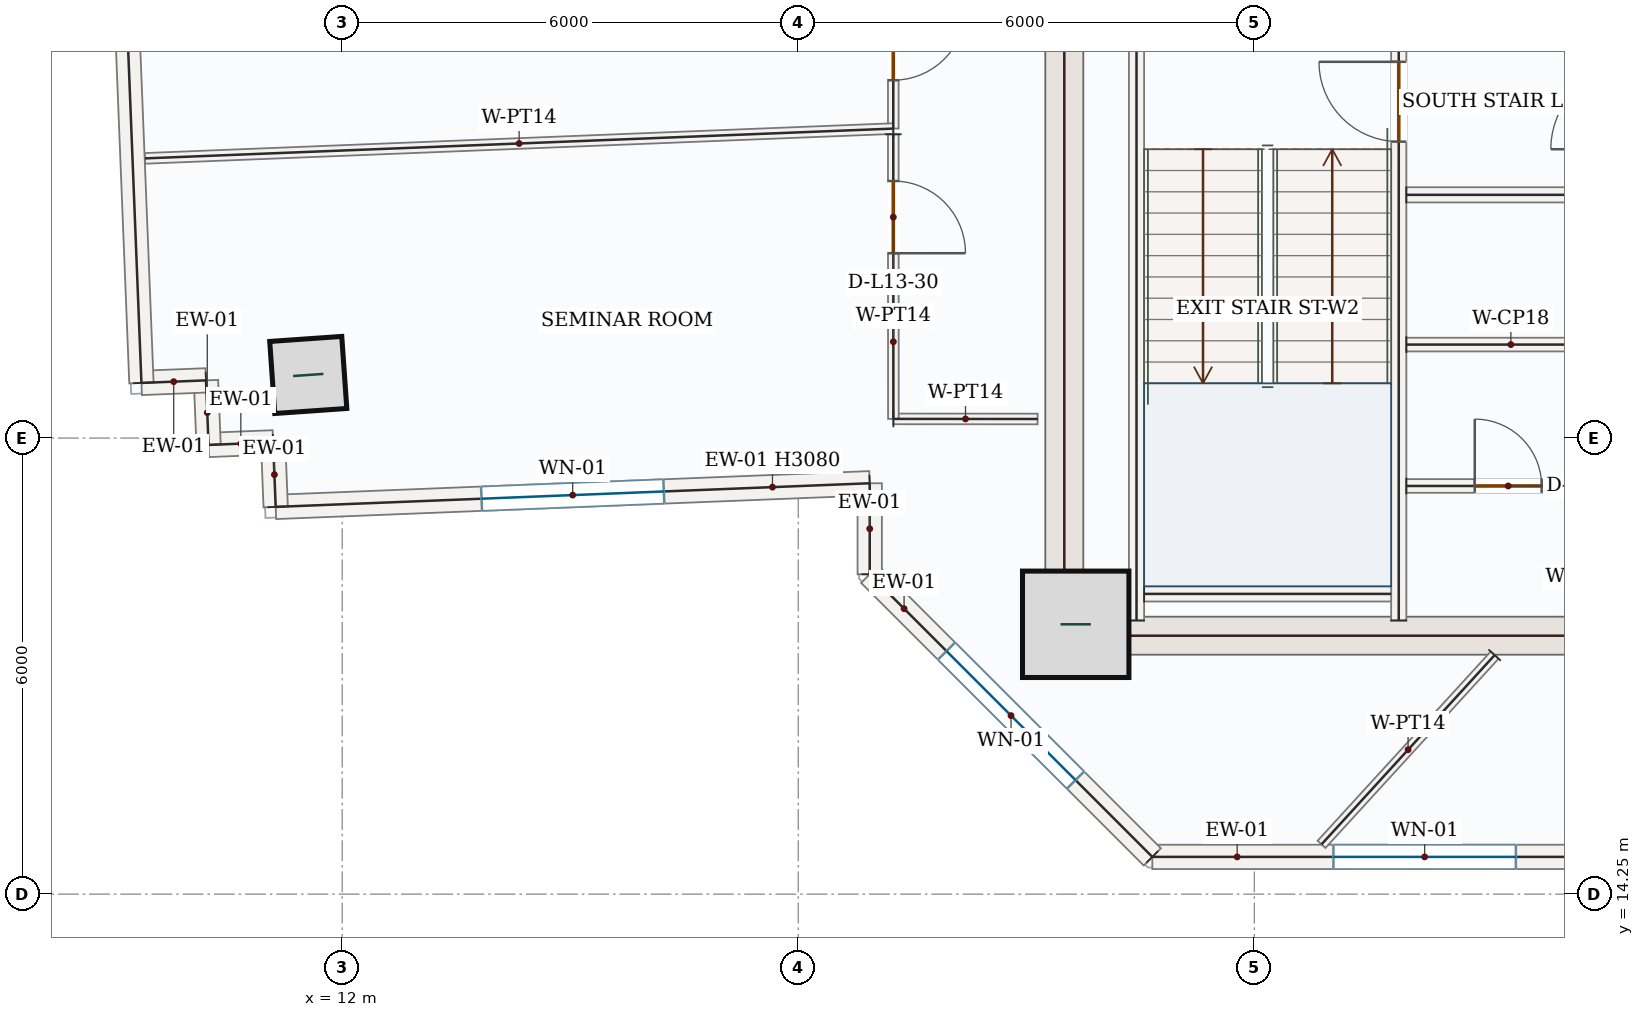
"""IFC4 building model, lengths in metres.
Left out: names, types, materials, properties, quantities, classifications, styles, units other than length and angle.
Written with IfcOpenShell. Run it as: python <this file> out.ifc"""

import sys

from ifc_helpers import new_model, si_unit, direction, frame, frame_2d, origin, origin_2d, place, context, subcontext, project, spatial, rectangle, hollow_rectangle, extrude, source, transform, mapped, element, fill, save


model = new_model("IFC4")
c1 = context("Model", 3, precision=1e-05, world=origin(), true_north=direction((0.0, 1.0)))
c2 = subcontext(c1, "Body", "Model", "MODEL_VIEW")
j1 = project(units=[si_unit("LENGTHUNIT", "METRE"), si_unit("PLANEANGLEUNIT", "RADIAN")], contexts=[c1])
p1 = place(None, origin())
s1 = spatial("IfcSite", under=j1, at=p1, CompositionType="ELEMENT")
p2 = place(p1, origin())
s2 = spatial("IfcBuilding", under=s1, at=p2, CompositionType="ELEMENT")
p3 = place(p2, frame((0.0, 0.0, 62.7)))
s3 = spatial("IfcBuildingStorey", under=s2, at=p3, CompositionType="ELEMENT", Elevation=62.7)
m1 = source(origin(), c2, "Body", "SweptSolid", [
    extrude(rectangle(XDim=8.55, YDim=0.5, at=frame_2d((4.275, 0.0))), origin(), (0.0, 0.0, 1.0), 3.95),
])
p4 = place(p3, frame((21.5, 17.4, 0.0), z_axis=(0.0, 0.0, 1.0), x_axis=(0.0, 1.0, 0.0)))
e1 = element("IfcWall", 1, at=p4, inside=s3, PredefinedType="SHEAR", context=c2, shape_type="MappedRepresentation", body=[
    mapped(m1, transform((0.0, 0.0, 0.0), x_axis=(1.0, 0.0, 0.0), y_axis=(0.0, 1.0, 0.0), z_axis=(0.0, 0.0, 1.0), scale=1.0)),
])
m2 = source(origin(), c2, "Body", "SweptSolid", [
    extrude(rectangle(XDim=7.0, YDim=0.5, at=frame_2d((3.5, 0.0))), origin(), (0.0, 0.0, 1.0), 3.95),
])
p5 = place(p3, frame((21.75, 17.65, 0.0), z_axis=(0.0, 0.0, 1.0), x_axis=(1.0, 0.0, 0.0)))
e2 = element("IfcWall", 2, at=p5, inside=s3, PredefinedType="SHEAR", context=c2, shape_type="MappedRepresentation", body=[
    mapped(m2, transform((0.0, 0.0, 0.0), x_axis=(1.0, 0.0, 0.0), y_axis=(0.0, 1.0, 0.0), z_axis=(0.0, 0.0, 1.0), scale=1.0)),
])
m3 = source(origin(), c2, "Body", "SweptSolid", [
    extrude(rectangle(XDim=1.4, YDim=1.4, at=origin_2d()), origin(), (0.0, 0.0, 1.0), 4.2),
])
p6 = place(p3, frame((21.65, 17.8, 0.0), z_axis=(0.0, 0.0, 1.0), x_axis=(1.0, 0.0, 0.0)))
e3 = element("IfcColumn", 3, at=p6, inside=s3, PredefinedType="COLUMN", context=c2, shape_type="MappedRepresentation", body=[
    mapped(m3, transform((0.0, 0.0, 0.0), x_axis=(1.0, 0.0, 0.0), y_axis=(0.0, 1.0, 0.0), z_axis=(0.0, 0.0, 1.0), scale=1.0)),
])
m4 = source(origin(), c2, "Body", "SweptSolid", [
    extrude(hollow_rectangle(XDim=0.95, YDim=0.95, WallThickness=0.05, at=origin_2d()), origin(), (0.0, 0.0, 1.0), 4.2),
])
p7 = place(p3, frame((11.553, 21.08, 0.0), z_axis=(0.0, 0.0, 1.0), x_axis=(0.99756405026, 0.069756473744, 0.0)))
e4 = element("IfcColumn", 4, at=p7, inside=s3, PredefinedType="COLUMN", context=c2, shape_type="MappedRepresentation", body=[
    mapped(m4, transform((0.0, 0.0, 0.0), x_axis=(1.0, 0.0, 0.0), y_axis=(0.0, 1.0, 0.0), z_axis=(0.0, 0.0, 1.0), scale=1.0)),
])
p8 = place(p3, frame((29.823, 14.74, 0.0), z_axis=(0.0, 0.0, 1.0), x_axis=(-1.0, 0.0, 0.0)))
e5 = element("IfcWall", 5, at=p8, inside=s3, PredefinedType="SOLIDWALL", context=c2, shape_type="SweptSolid", body=[
    extrude(rectangle(XDim=7.165, YDim=0.32, at=frame_2d((3.583, 0.0))), origin(), (0.0, 0.0, 1.0), 3.95),
])
p9 = place(p8, frame((2.382, 0.0, 0.85)))
e6 = element("IfcOpeningElement", 6, at=p9, cuts=e5, PredefinedType="OPENING", context=c2, shape_type="SweptSolid", body=[
    extrude(rectangle(XDim=2.4, YDim=1.8, at=frame_2d((1.2, 0.9))), frame((0.0, 0.17, 0.0), z_axis=(0.0, -1.0, 0.0), x_axis=(1.0, 0.0, 0.0)), (0.0, 0.0, 1.0), 0.34),
])
p10 = place(p3, frame((22.658, 14.74, 0.0), z_axis=(0.0, 0.0, 1.0), x_axis=(-0.707106781187, 0.707106781187, 0.0)))
e7 = element("IfcWall", 7, at=p10, inside=s3, PredefinedType="SOLIDWALL", context=c2, shape_type="SweptSolid", body=[
    extrude(rectangle(XDim=5.258, YDim=0.32, at=frame_2d((2.629, 0.0))), origin(), (0.0, 0.0, 1.0), 3.95),
])
p11 = place(p10, frame((1.429, 0.0, 0.85)))
e8 = element("IfcOpeningElement", 8, at=p11, cuts=e7, PredefinedType="OPENING", context=c2, shape_type="SweptSolid", body=[
    extrude(rectangle(XDim=2.4, YDim=1.8, at=frame_2d((1.2, 0.9))), frame((0.0, 0.17, 0.0), z_axis=(0.0, -1.0, 0.0), x_axis=(1.0, 0.0, 0.0)), (0.0, 0.0, 1.0), 0.34),
])
m5 = source(origin(), c2, "Body", "SweptSolid", [
    extrude(rectangle(XDim=1.198, YDim=0.32, at=frame_2d((0.599, 0.0))), origin(), (0.0, 0.0, 1.0), 3.95),
])
p12 = place(p3, frame((18.94, 18.458, 0.0), z_axis=(0.0, 0.0, 1.0), x_axis=(0.0, 1.0, 0.0)))
e9 = element("IfcWall", 9, at=p12, inside=s3, PredefinedType="SOLIDWALL", context=c2, shape_type="MappedRepresentation", body=[
    mapped(m5, transform((0.0, 0.0, 0.0), x_axis=(1.0, 0.0, 0.0), y_axis=(0.0, 1.0, 0.0), z_axis=(0.0, 0.0, 1.0), scale=1.0)),
])
p13 = place(p3, frame((18.94, 19.656, 0.0), z_axis=(0.0, 0.0, 1.0), x_axis=(-0.999208917222, -0.039768577336, 0.0)))
e10 = element("IfcWall", 10, at=p13, inside=s3, PredefinedType="SOLIDWALL", context=c2, shape_type="SweptSolid", body=[
    extrude(rectangle(XDim=7.821, YDim=0.32, at=frame_2d((3.911, 0.0))), origin(), (0.0, 0.0, 1.0), 3.08),
])
p14 = place(p13, frame((2.711, 0.0, 0.85)))
e11 = element("IfcOpeningElement", 11, at=p14, cuts=e10, PredefinedType="OPENING", context=c2, shape_type="SweptSolid", body=[
    extrude(rectangle(XDim=2.4, YDim=1.8, at=frame_2d((1.2, 0.9))), frame((0.0, 0.17, 0.0), z_axis=(0.0, -1.0, 0.0), x_axis=(1.0, 0.0, 0.0)), (0.0, 0.0, 1.0), 0.34),
])
m6 = source(origin(), c2, "Body", "SweptSolid", [
    extrude(rectangle(XDim=0.85, YDim=0.32, at=frame_2d((0.425, 0.0))), origin(), (0.0, 0.0, 1.0), 3.95),
])
p15 = place(p3, frame((11.125, 19.344, 0.0), z_axis=(0.0, 0.0, 1.0), x_axis=(-0.039933618331, 0.999202334929, 0.0)))
e12 = element("IfcWall", 12, at=p15, inside=s3, PredefinedType="SOLIDWALL", context=c2, shape_type="MappedRepresentation", body=[
    mapped(m6, transform((0.0, 0.0, 0.0), x_axis=(1.0, 0.0, 0.0), y_axis=(0.0, 1.0, 0.0), z_axis=(0.0, 0.0, 1.0), scale=1.0)),
])
m7 = source(origin(), c2, "Body", "SweptSolid", [
    extrude(rectangle(XDim=0.85, YDim=0.32, at=frame_2d((0.425, 0.0))), origin(), (0.0, 0.0, 1.0), 3.95),
])
for number, where, z_axis, x_axis in (
    (13, (11.091, 20.194, 0.0), (0.0, 0.0, 1.0), (-0.999, -0.04, 0.0)),
    (14, (10.242, 20.16, 0.0), (0.0, 0.0, 1.0), (-0.04, 0.999, 0.0)),
    (15, (10.208, 21.009, 0.0), (0.0, 0.0, 1.0), (-0.999, -0.04, 0.0)),
):
    element("IfcWall", number, at=place(p3, frame(where, z_axis=z_axis, x_axis=x_axis)), inside=s3, PredefinedType="SOLIDWALL", context=c2, shape_type="MappedRepresentation", body=[
        mapped(m7, transform((0.0, 0.0, 0.0), x_axis=(1.0, 0.0, 0.0), y_axis=(0.0, 1.0, 0.0), z_axis=(0.0, 0.0, 1.0), scale=1.0)),
    ])
m8 = source(origin(), c2, "Body", "SweptSolid", [
    extrude(rectangle(XDim=9.92, YDim=0.32, at=frame_2d((4.96, 0.0))), origin(), (0.0, 0.0, 1.0), 3.95),
])
p16 = place(p3, frame((9.359, 20.975, 0.0), z_axis=(0.0, 0.0, 1.0), x_axis=(-0.03977146366, 0.999208802342, 0.0)))
e16 = element("IfcWall", 16, at=p16, inside=s3, PredefinedType="SOLIDWALL", context=c2, shape_type="MappedRepresentation", body=[
    mapped(m8, transform((0.0, 0.0, 0.0), x_axis=(1.0, 0.0, 0.0), y_axis=(0.0, 1.0, 0.0), z_axis=(0.0, 0.0, 1.0), scale=1.0)),
])
m9 = source(origin(), c2, "Body", "SweptSolid", [
    extrude(rectangle(XDim=7.87, YDim=0.2, at=frame_2d((3.935, 0.0))), origin(), (0.0, 0.0, 1.0), 3.95),
])
p17 = place(p3, frame((22.45, 17.85, 0.0), z_axis=(0.0, 0.0, 1.0), x_axis=(0.0, 1.0, 0.0)))
e17 = element("IfcWall", 17, at=p17, inside=s3, PredefinedType="SOLIDWALL", context=c2, shape_type="MappedRepresentation", body=[
    mapped(m9, transform((0.0, 0.0, 0.0), x_axis=(1.0, 0.0, 0.0), y_axis=(0.0, 1.0, 0.0), z_axis=(0.0, 0.0, 1.0), scale=1.0)),
])
p18 = place(p3, frame((25.9, 17.85, 0.0), z_axis=(0.0, 0.0, 1.0), x_axis=(0.0, 1.0, 0.0)))
e18 = element("IfcWall", 18, at=p18, inside=s3, PredefinedType="SOLIDWALL", context=c2, shape_type="SweptSolid", body=[
    extrude(rectangle(XDim=8.0, YDim=0.2, at=frame_2d((4.0, 0.0))), origin(), (0.0, 0.0, 1.0), 3.95),
])
p19 = place(p18, frame((6.3, 0.0, 0.0)))
e19 = element("IfcOpeningElement", 19, at=p19, cuts=e18, PredefinedType="OPENING", context=c2, shape_type="SweptSolid", body=[
    extrude(rectangle(XDim=1.05, YDim=2.15, at=frame_2d((0.525, 1.075))), frame((0.0, 0.11, 0.0), z_axis=(0.0, -1.0, 0.0), x_axis=(1.0, 0.0, 0.0)), (0.0, 0.0, 1.0), 0.22),
])
m10 = source(origin(), c2, "Body", "SweptSolid", [
    extrude(rectangle(XDim=3.25, YDim=0.2, at=frame_2d((1.625, 0.0))), origin(), (0.0, 0.0, 1.0), 3.95),
])
p20 = place(p3, frame((22.55, 18.2, 0.0), z_axis=(0.0, 0.0, 1.0), x_axis=(1.0, 0.0, 0.0)))
e20 = element("IfcWall", 20, at=p20, inside=s3, PredefinedType="SOLIDWALL", context=c2, shape_type="MappedRepresentation", body=[
    mapped(m10, transform((0.0, 0.0, 0.0), x_axis=(1.0, 0.0, 0.0), y_axis=(0.0, 1.0, 0.0), z_axis=(0.0, 0.0, 1.0), scale=1.0)),
])
m11 = source(origin(), c2, "Body", "SweptSolid", [
    extrude(rectangle(XDim=2.75, YDim=0.2, at=frame_2d((1.375, 0.0))), origin(), (0.0, 0.0, 1.0), 3.95),
])
p21 = place(p3, frame((26.0, 23.45, 0.0), z_axis=(0.0, 0.0, 1.0), x_axis=(1.0, 0.0, 0.0)))
e21 = element("IfcWall", 21, at=p21, inside=s3, PredefinedType="SOLIDWALL", context=c2, shape_type="MappedRepresentation", body=[
    mapped(m11, transform((0.0, 0.0, 0.0), x_axis=(1.0, 0.0, 0.0), y_axis=(0.0, 1.0, 0.0), z_axis=(0.0, 0.0, 1.0), scale=1.0)),
])
p22 = place(p3, frame((26.0, 19.62, 0.0), z_axis=(0.0, 0.0, 1.0), x_axis=(1.0, 0.0, 0.0)))
e22 = element("IfcWall", 22, at=p22, inside=s3, PredefinedType="PARTITIONING", context=c2, shape_type="SweptSolid", body=[
    extrude(rectangle(XDim=2.75, YDim=0.18, at=frame_2d((1.375, 0.0))), origin(), (0.0, 0.0, 1.0), 3.95),
])
p23 = place(p22, frame((0.9, 0.0, 0.0)))
e23 = element("IfcOpeningElement", 23, at=p23, cuts=e22, PredefinedType="OPENING", context=c2, shape_type="SweptSolid", body=[
    extrude(rectangle(XDim=0.88, YDim=2.1, at=frame_2d((0.44, 1.05))), frame((0.0, 0.1, 0.0), z_axis=(0.0, -1.0, 0.0), x_axis=(1.0, 0.0, 0.0)), (0.0, 0.0, 1.0), 0.2),
])
m12 = source(origin(), c2, "Body", "SweptSolid", [
    extrude(rectangle(XDim=2.75, YDim=0.18, at=frame_2d((1.375, 0.0))), origin(), (0.0, 0.0, 1.0), 3.95),
])
p24 = place(p3, frame((26.0, 21.48, 0.0), z_axis=(0.0, 0.0, 1.0), x_axis=(1.0, 0.0, 0.0)))
e24 = element("IfcWall", 24, at=p24, inside=s3, PredefinedType="PARTITIONING", context=c2, shape_type="MappedRepresentation", body=[
    mapped(m12, transform((0.0, 0.0, 0.0), x_axis=(1.0, 0.0, 0.0), y_axis=(0.0, 1.0, 0.0), z_axis=(0.0, 0.0, 1.0), scale=1.0)),
])
p25 = place(p3, frame((19.25, 28.165, 0.0), z_axis=(0.0, 0.0, 1.0), x_axis=(0.0, -1.0, 0.0)))
e25 = element("IfcWall", 25, at=p25, inside=s3, PredefinedType="PARTITIONING", context=c2, shape_type="SweptSolid", body=[
    extrude(rectangle(XDim=3.843, YDim=0.14, at=frame_2d((1.921, 0.0))), origin(), (0.0, 0.0, 1.0), 3.95),
])
p26 = place(p25, frame((2.257, 0.0, 0.0)))
e26 = element("IfcOpeningElement", 26, at=p26, cuts=e25, PredefinedType="OPENING", context=c2, shape_type="SweptSolid", body=[
    extrude(rectangle(XDim=0.95, YDim=2.15, at=frame_2d((0.475, 1.075))), frame((0.0, 0.08, 0.0), z_axis=(0.0, -1.0, 0.0), x_axis=(1.0, 0.0, 0.0)), (0.0, 0.0, 1.0), 0.16),
])
m13 = source(origin(), c2, "Body", "SweptSolid", [
    extrude(rectangle(XDim=9.851, YDim=0.14, at=frame_2d((4.925, 0.0))), origin(), (0.0, 0.0, 1.0), 3.95),
])
p27 = place(p3, frame((19.249, 24.322, 0.0), z_axis=(0.0, 0.0, 1.0), x_axis=(-0.999208542072, -0.039778002084, 0.0)))
e27 = element("IfcWall", 27, at=p27, inside=s3, PredefinedType="PARTITIONING", context=c2, shape_type="MappedRepresentation", body=[
    mapped(m13, transform((0.0, 0.0, 0.0), x_axis=(1.0, 0.0, 0.0), y_axis=(0.0, 1.0, 0.0), z_axis=(0.0, 0.0, 1.0), scale=1.0)),
])
m14 = source(origin(), c2, "Body", "SweptSolid", [
    extrude(rectangle(XDim=1.898, YDim=0.14, at=frame_2d((0.949, 0.0))), origin(), (0.0, 0.0, 1.0), 3.95),
])
p28 = place(p3, frame((19.251, 20.502, 0.0), z_axis=(0.0, 0.0, 1.0), x_axis=(0.999999793113, -0.00064325215, 0.0)))
e28 = element("IfcWall", 28, at=p28, inside=s3, PredefinedType="PARTITIONING", context=c2, shape_type="MappedRepresentation", body=[
    mapped(m14, transform((0.0, 0.0, 0.0), x_axis=(1.0, 0.0, 0.0), y_axis=(0.0, 1.0, 0.0), z_axis=(0.0, 0.0, 1.0), scale=1.0)),
])
m15 = source(origin(), c2, "Body", "SweptSolid", [
    extrude(rectangle(XDim=3.375, YDim=0.14, at=frame_2d((1.688, 0.0))), origin(), (0.0, 0.0, 1.0), 3.95),
])
p29 = place(p3, frame((27.162, 17.395, 0.0), z_axis=(0.0, 0.0, 1.0), x_axis=(-0.674974079893, -0.737841440604, 0.0)))
e29 = element("IfcWall", 29, at=p29, inside=s3, PredefinedType="PARTITIONING", context=c2, shape_type="MappedRepresentation", body=[
    mapped(m15, transform((0.0, 0.0, 0.0), x_axis=(1.0, 0.0, 0.0), y_axis=(0.0, 1.0, 0.0), z_axis=(0.0, 0.0, 1.0), scale=1.0)),
])
p30 = place(p3, frame((19.25, 24.247, 0.0), z_axis=(0.0, 0.0, 1.0), x_axis=(0.000326008981, -0.999999946859, 0.0)))
e30 = element("IfcWall", 30, at=p30, inside=s3, PredefinedType="PARTITIONING", context=c2, shape_type="SweptSolid", body=[
    extrude(rectangle(XDim=3.744, YDim=0.14, at=frame_2d((1.872, 0.0))), origin(), (0.0, 0.0, 1.0), 3.95),
])
p31 = place(p30, frame((0.615, 0.0, 0.0)))
e31 = element("IfcOpeningElement", 31, at=p31, cuts=e30, PredefinedType="OPENING", context=c2, shape_type="SweptSolid", body=[
    extrude(rectangle(XDim=0.95, YDim=2.15, at=frame_2d((0.475, 1.075))), frame((0.0, 0.08, 0.0), z_axis=(0.0, -1.0, 0.0), x_axis=(1.0, 0.0, 0.0)), (0.0, 0.0, 1.0), 0.16),
])
m16 = source(origin(), c2, "Body", "SweptSolid", [
    extrude(rectangle(XDim=2.4, YDim=1.8, at=frame_2d((1.2, 0.9))), frame((0.0, 0.03, 0.0), z_axis=(0.0, -1.0, 0.0), x_axis=(1.0, 0.0, 0.0)), (0.0, 0.0, 1.0), 0.06),
])
p32 = place(p9, origin())
e32 = element("IfcWindow", 32, at=p32, inside=s3, PartitioningType="DOUBLE_PANEL_VERTICAL", PredefinedType="WINDOW", context=c2, shape_type="MappedRepresentation", body=[
    mapped(m16, transform((0.0, 0.0, 0.0), x_axis=(1.0, 0.0, 0.0), y_axis=(0.0, 1.0, 0.0), z_axis=(0.0, 0.0, 1.0), scale=1.0)),
])
fill(e6, e32)
p33 = place(p11, origin())
e33 = element("IfcWindow", 33, at=p33, inside=s3, PartitioningType="DOUBLE_PANEL_VERTICAL", PredefinedType="WINDOW", context=c2, shape_type="MappedRepresentation", body=[
    mapped(m16, transform((0.0, 0.0, 0.0), x_axis=(1.0, 0.0, 0.0), y_axis=(0.0, 1.0, 0.0), z_axis=(0.0, 0.0, 1.0), scale=1.0)),
])
fill(e8, e33)
p34 = place(p14, origin())
e34 = element("IfcWindow", 34, at=p34, inside=s3, PartitioningType="DOUBLE_PANEL_VERTICAL", PredefinedType="WINDOW", context=c2, shape_type="MappedRepresentation", body=[
    mapped(m16, transform((0.0, 0.0, 0.0), x_axis=(1.0, 0.0, 0.0), y_axis=(0.0, 1.0, 0.0), z_axis=(0.0, 0.0, 1.0), scale=1.0)),
])
fill(e11, e34)
m17 = source(origin(), c2, "Body", "SweptSolid", [
    extrude(rectangle(XDim=1.05, YDim=2.15, at=frame_2d((0.525, 1.075))), frame((0.0, 0.025, 0.0), z_axis=(0.0, -1.0, 0.0), x_axis=(1.0, 0.0, 0.0)), (0.0, 0.0, 1.0), 0.05),
])
p35 = place(p19, origin())
e35 = element("IfcDoor", 35, at=p35, inside=s3, OperationType="SINGLE_SWING_RIGHT", PredefinedType="DOOR", context=c2, shape_type="MappedRepresentation", body=[
    mapped(m17, transform((0.0, 0.0, 0.0), x_axis=(1.0, 0.0, 0.0), y_axis=(0.0, 1.0, 0.0), z_axis=(0.0, 0.0, 1.0), scale=1.0)),
])
fill(e19, e35)
m18 = source(origin(), c2, "Body", "SweptSolid", [
    extrude(rectangle(XDim=0.88, YDim=2.1, at=frame_2d((0.44, 1.05))), frame((0.0, 0.025, 0.0), z_axis=(0.0, -1.0, 0.0), x_axis=(1.0, 0.0, 0.0)), (0.0, 0.0, 1.0), 0.05),
])
p36 = place(p23, origin())
e36 = element("IfcDoor", 36, at=p36, inside=s3, OperationType="SINGLE_SWING_LEFT", PredefinedType="DOOR", context=c2, shape_type="MappedRepresentation", body=[
    mapped(m18, transform((0.0, 0.0, 0.0), x_axis=(1.0, 0.0, 0.0), y_axis=(0.0, 1.0, 0.0), z_axis=(0.0, 0.0, 1.0), scale=1.0)),
])
fill(e23, e36)
m19 = source(origin(), c2, "Body", "SweptSolid", [
    extrude(rectangle(XDim=0.95, YDim=2.15, at=frame_2d((0.475, 1.075))), frame((0.0, 0.025, 0.0), z_axis=(0.0, -1.0, 0.0), x_axis=(1.0, 0.0, 0.0)), (0.0, 0.0, 1.0), 0.05),
])
p37 = place(p26, origin())
e37 = element("IfcDoor", 37, at=p37, inside=s3, OperationType="SINGLE_SWING_LEFT", PredefinedType="DOOR", context=c2, shape_type="MappedRepresentation", body=[
    mapped(m19, transform((0.0, 0.0, 0.0), x_axis=(1.0, 0.0, 0.0), y_axis=(0.0, 1.0, 0.0), z_axis=(0.0, 0.0, 1.0), scale=1.0)),
])
fill(e26, e37)
p38 = place(p31, origin())
e38 = element("IfcDoor", 38, at=p38, inside=s3, OperationType="SINGLE_SWING_RIGHT", PredefinedType="DOOR", context=c2, shape_type="MappedRepresentation", body=[
    mapped(m19, transform((0.0, 0.0, 0.0), x_axis=(1.0, 0.0, 0.0), y_axis=(0.0, 1.0, 0.0), z_axis=(0.0, 0.0, 1.0), scale=1.0)),
])
fill(e31, e38)
save(model, sys.argv[1])
